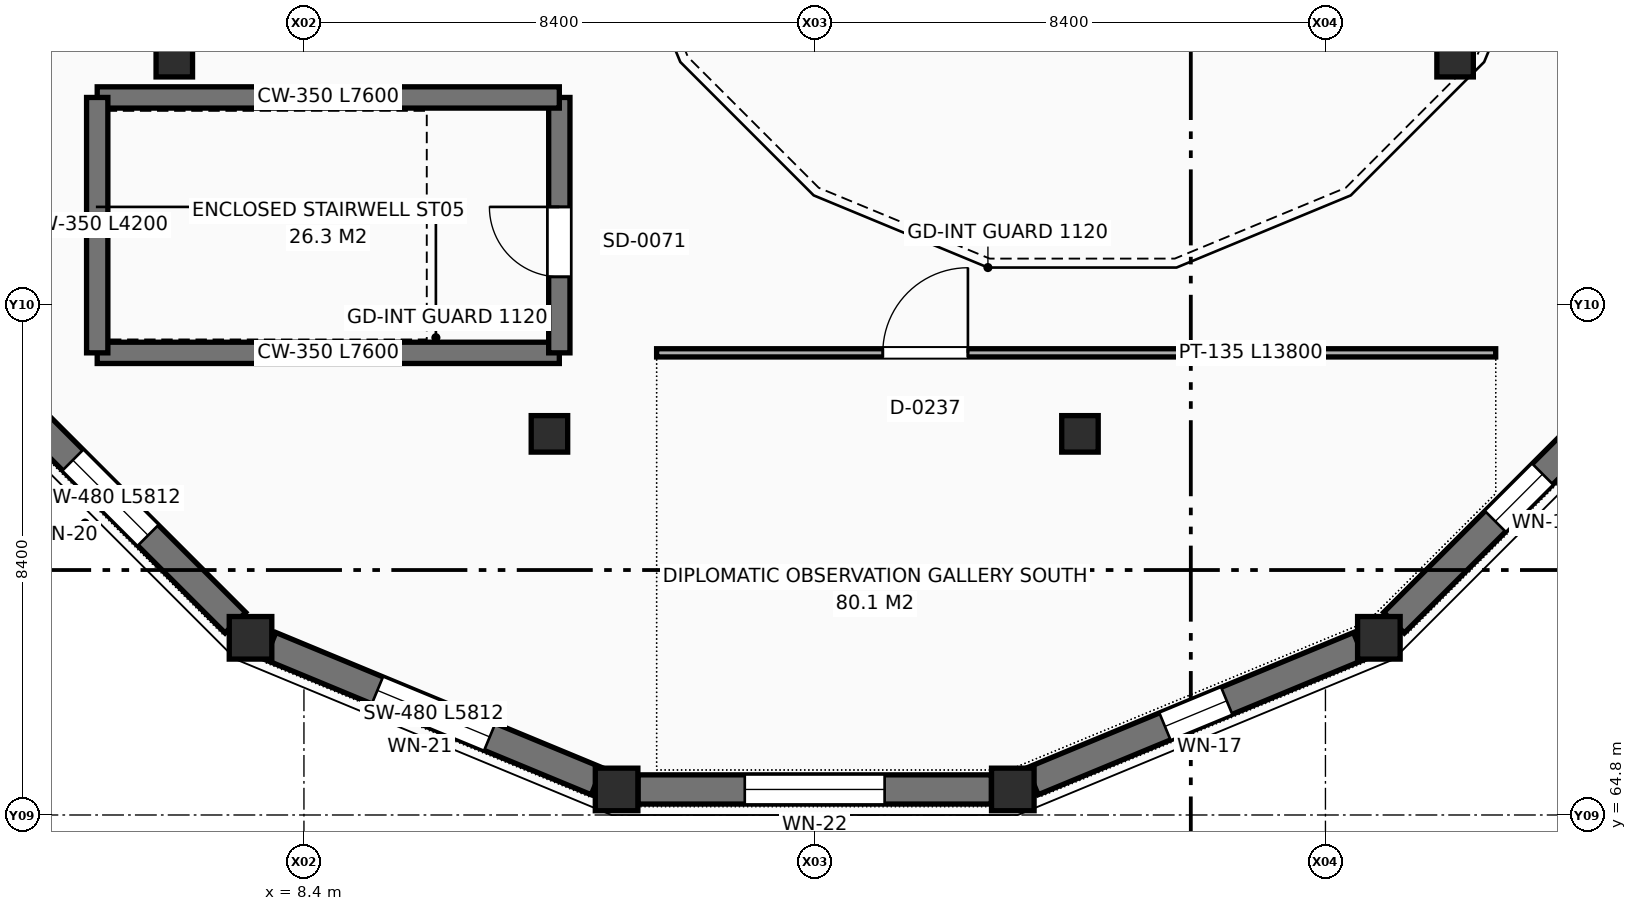
"""IFC4 building model, lengths in metres.
Left out: names, types, materials, properties, quantities, classifications, styles, units other than length and angle.
Written with IfcOpenShell. Run it as: python <this file> out.ifc"""

import sys

from ifc_helpers import new_model, si_unit, direction, frame, frame_2d, origin, origin_2d, place, context, subcontext, project, spatial, rectangle, circle, extrude, element, fill, save


model = new_model("IFC4")
c1 = context("Model", 3, precision=1e-05, world=origin(), true_north=direction((0.0, 1.0)))
c2 = subcontext(c1, "Body", "Model", "MODEL_VIEW")
j1 = project(units=[si_unit("LENGTHUNIT", "METRE"), si_unit("PLANEANGLEUNIT", "RADIAN")], contexts=[c1])
p1 = place(None, origin())
s1 = spatial("IfcSite", under=j1, at=p1, CompositionType="ELEMENT")
p2 = place(p1, origin())
s2 = spatial("IfcBuilding", under=s1, at=p2, CompositionType="ELEMENT")
p3 = place(p2, frame((0.0, 0.0, 13.8)))
s3 = spatial("IfcBuildingStorey", under=s2, at=p3, CompositionType="ELEMENT", Elevation=13.8)
for number, where, z_axis, x_axis in (
    (1, (7.521, 67.714, 0.0), (0.0, 0.0, 1.0), (1.0, 0.0, 0.0)),
    (2, (13.542, 65.22, 0.0), (0.0, 0.0, 1.0), (1.0, 0.0, 0.0)),
    (3, (20.058, 65.22, 0.0), (0.0, 0.0, 1.0), (1.0, 0.0, 0.0)),
    (4, (26.079, 67.714, 0.0), (0.0, 0.0, 1.0), (1.0, 0.0, 0.0)),
):
    element("IfcColumn", number, at=place(p3, frame(where, z_axis=z_axis, x_axis=x_axis)), inside=s3, PredefinedType="COLUMN", context=c2, shape_type="SweptSolid", body=[
        extrude(circle(Radius=0.35, at=origin_2d()), origin(), (0.0, 0.0, 1.0), 4.2),
    ])
for number, where, z_axis, x_axis in (
    (5, (6.268, 77.237, 0.0), (0.0, 0.0, 1.0), (1.0, 0.0, 0.0)),
    (6, (12.438, 71.068, 0.0), (0.0, 0.0, 1.0), (1.0, 0.0, 0.0)),
    (7, (21.163, 71.068, 0.0), (0.0, 0.0, 1.0), (1.0, 0.0, 0.0)),
    (8, (27.332, 77.237, 0.0), (0.0, 0.0, 1.0), (1.0, 0.0, 0.0)),
):
    element("IfcColumn", number, at=place(p3, frame(where, z_axis=z_axis, x_axis=x_axis)), inside=s3, PredefinedType="COLUMN", context=c2, shape_type="SweptSolid", body=[
        extrude(circle(Radius=0.3, at=origin_2d()), origin(), (0.0, 0.0, 1.0), 4.2),
    ])
p4 = place(p3, frame((3.163, 72.073, 0.0), z_axis=(0.0, 0.0, 1.0), x_axis=(0.707127782591, -0.707085779159, 0.0)))
e9 = element("IfcWall", 9, at=p4, inside=s3, PredefinedType="SHEAR", context=c2, shape_type="SweptSolid", body=[
    extrude(rectangle(XDim=5.812, YDim=0.48, at=frame_2d((2.906, 0.0))), origin(), (0.0, 0.0, 1.0), 3.1),
])
p5 = place(p4, frame((2.031, 0.0, 0.9)))
e10 = element("IfcOpeningElement", 10, at=p5, cuts=e9, PredefinedType="OPENING", context=c2, shape_type="SweptSolid", body=[
    extrude(rectangle(XDim=1.75, YDim=1.8, at=frame_2d((0.875, 0.9))), frame((0.0, 0.25, 0.0), z_axis=(0.0, -1.0, 0.0), x_axis=(1.0, 0.0, 0.0)), (0.0, 0.0, 1.0), 0.5),
])
p6 = place(p3, frame((7.847, 67.579, 0.0), z_axis=(0.0, 0.0, 1.0), x_axis=(0.923873997664, -0.382696794395, 0.0)))
e11 = element("IfcWall", 11, at=p6, inside=s3, PredefinedType="SHEAR", context=c2, shape_type="SweptSolid", body=[
    extrude(rectangle(XDim=5.812, YDim=0.48, at=frame_2d((2.906, 0.0))), origin(), (0.0, 0.0, 1.0), 3.1),
])
p7 = place(p6, frame((1.906, 0.0, 0.9)))
e12 = element("IfcOpeningElement", 12, at=p7, cuts=e11, PredefinedType="OPENING", context=c2, shape_type="SweptSolid", body=[
    extrude(rectangle(XDim=2.0, YDim=1.8, at=frame_2d((1.0, 0.9))), frame((0.0, 0.25, 0.0), z_axis=(0.0, -1.0, 0.0), x_axis=(1.0, 0.0, 0.0)), (0.0, 0.0, 1.0), 0.5),
])
p8 = place(p3, frame((13.894, 65.22, 0.0), z_axis=(0.0, 0.0, 1.0), x_axis=(1.0, 0.0, 0.0)))
e13 = element("IfcWall", 13, at=p8, inside=s3, PredefinedType="SHEAR", context=c2, shape_type="SweptSolid", body=[
    extrude(rectangle(XDim=5.812, YDim=0.48, at=frame_2d((2.906, 0.0))), origin(), (0.0, 0.0, 1.0), 3.1),
])
p9 = place(p8, frame((1.756, 0.0, 0.9)))
e14 = element("IfcOpeningElement", 14, at=p9, cuts=e13, PredefinedType="OPENING", context=c2, shape_type="SweptSolid", body=[
    extrude(rectangle(XDim=2.3, YDim=1.8, at=frame_2d((1.15, 0.9))), frame((0.0, 0.25, 0.0), z_axis=(0.0, -1.0, 0.0), x_axis=(1.0, 0.0, 0.0)), (0.0, 0.0, 1.0), 0.5),
])
p10 = place(p3, frame((20.383, 65.355, 0.0), z_axis=(0.0, 0.0, 1.0), x_axis=(0.923880149052, 0.3826819439, 0.0)))
e15 = element("IfcWall", 15, at=p10, inside=s3, PredefinedType="SHEAR", context=c2, shape_type="SweptSolid", body=[
    extrude(rectangle(XDim=5.812, YDim=0.48, at=frame_2d((2.906, 0.0))), origin(), (0.0, 0.0, 1.0), 3.1),
])
p11 = place(p10, frame((2.356, 0.0, 0.9)))
e16 = element("IfcOpeningElement", 16, at=p11, cuts=e15, PredefinedType="OPENING", context=c2, shape_type="SweptSolid", body=[
    extrude(rectangle(XDim=1.1, YDim=1.8, at=frame_2d((0.55, 0.9))), frame((0.0, 0.25, 0.0), z_axis=(0.0, -1.0, 0.0), x_axis=(1.0, 0.0, 0.0)), (0.0, 0.0, 1.0), 0.5),
])
p12 = place(p3, frame((26.327, 67.963, 0.0), z_axis=(0.0, 0.0, 1.0), x_axis=(0.707127782591, 0.707085779159, 0.0)))
e17 = element("IfcWall", 17, at=p12, inside=s3, PredefinedType="SHEAR", context=c2, shape_type="SweptSolid", body=[
    extrude(rectangle(XDim=5.812, YDim=0.48, at=frame_2d((2.906, 0.0))), origin(), (0.0, 0.0, 1.0), 3.1),
])
p13 = place(p12, frame((2.356, 0.0, 0.9)))
e18 = element("IfcOpeningElement", 18, at=p13, cuts=e17, PredefinedType="OPENING", context=c2, shape_type="SweptSolid", body=[
    extrude(rectangle(XDim=1.1, YDim=1.8, at=frame_2d((0.55, 0.9))), frame((0.0, 0.25, 0.0), z_axis=(0.0, -1.0, 0.0), x_axis=(1.0, 0.0, 0.0)), (0.0, 0.0, 1.0), 0.5),
])
p14 = place(p3, frame((5.0, 72.4, 0.0), z_axis=(0.0, 0.0, 1.0), x_axis=(1.0, 0.0, 0.0)))
e19 = element("IfcWall", 19, at=p14, inside=s3, PredefinedType="SHEAR", context=c2, shape_type="SweptSolid", body=[
    extrude(rectangle(XDim=7.6, YDim=0.35, at=frame_2d((3.8, 0.0))), origin(), (0.0, 0.0, 1.0), 3.92),
])
p15 = place(p3, frame((12.6, 72.4, 0.0), z_axis=(0.0, 0.0, 1.0), x_axis=(0.0, 1.0, 0.0)))
e20 = element("IfcWall", 20, at=p15, inside=s3, PredefinedType="SHEAR", context=c2, shape_type="SweptSolid", body=[
    extrude(rectangle(XDim=4.2, YDim=0.35, at=frame_2d((2.1, 0.0))), origin(), (0.0, 0.0, 1.0), 3.92),
])
p16 = place(p15, frame((1.25, 0.0, 0.0)))
e21 = element("IfcOpeningElement", 21, at=p16, cuts=e20, PredefinedType="OPENING", context=c2, shape_type="SweptSolid", body=[
    extrude(rectangle(XDim=1.15, YDim=2.2, at=frame_2d((0.575, 1.1))), frame((0.0, 0.185, 0.0), z_axis=(0.0, -1.0, 0.0), x_axis=(1.0, 0.0, 0.0)), (0.0, 0.0, 1.0), 0.37),
])
p17 = place(p3, frame((12.6, 76.6, 0.0), z_axis=(0.0, 0.0, 1.0), x_axis=(-1.0, 0.0, 0.0)))
e22 = element("IfcWall", 22, at=p17, inside=s3, PredefinedType="SHEAR", context=c2, shape_type="SweptSolid", body=[
    extrude(rectangle(XDim=7.6, YDim=0.35, at=frame_2d((3.8, 0.0))), origin(), (0.0, 0.0, 1.0), 3.92),
])
p18 = place(p3, frame((5.0, 76.6, 0.0), z_axis=(0.0, 0.0, 1.0), x_axis=(0.0, -1.0, 0.0)))
e23 = element("IfcWall", 23, at=p18, inside=s3, PredefinedType="SHEAR", context=c2, shape_type="SweptSolid", body=[
    extrude(rectangle(XDim=4.2, YDim=0.35, at=frame_2d((2.1, 0.0))), origin(), (0.0, 0.0, 1.0), 3.92),
])
p19 = place(p3, frame((14.2, 72.4, 0.0), z_axis=(0.0, 0.0, 1.0), x_axis=(1.0, 0.0, 0.0)))
e24 = element("IfcWall", 24, at=p19, inside=s3, PredefinedType="PARTITIONING", context=c2, shape_type="SweptSolid", body=[
    extrude(rectangle(XDim=13.8, YDim=0.135, at=frame_2d((6.9, 0.0))), origin(), (0.0, 0.0, 1.0), 3.86),
])
p20 = place(p19, frame((3.72, 0.0, 0.0)))
e25 = element("IfcOpeningElement", 25, at=p20, cuts=e24, PredefinedType="OPENING", context=c2, shape_type="SweptSolid", body=[
    extrude(rectangle(XDim=1.4, YDim=2.25, at=frame_2d((0.7, 1.125))), frame((0.0, 0.077, 0.0), z_axis=(0.0, -1.0, 0.0), x_axis=(1.0, 0.0, 0.0)), (0.0, 0.0, 1.0), 0.155),
])
p21 = place(p5, origin())
e26 = element("IfcWindow", 26, at=p21, inside=s3, PartitioningType="SINGLE_PANEL", PredefinedType="WINDOW", context=c2, shape_type="SweptSolid", body=[
    extrude(rectangle(XDim=1.75, YDim=1.8, at=frame_2d((0.875, 0.9))), frame((0.0, 0.03, 0.0), z_axis=(0.0, -1.0, 0.0), x_axis=(1.0, 0.0, 0.0)), (0.0, 0.0, 1.0), 0.06),
])
fill(e10, e26)
p22 = place(p7, origin())
e27 = element("IfcWindow", 27, at=p22, inside=s3, PartitioningType="SINGLE_PANEL", PredefinedType="WINDOW", context=c2, shape_type="SweptSolid", body=[
    extrude(rectangle(XDim=2.0, YDim=1.8, at=frame_2d((1.0, 0.9))), frame((0.0, 0.03, 0.0), z_axis=(0.0, -1.0, 0.0), x_axis=(1.0, 0.0, 0.0)), (0.0, 0.0, 1.0), 0.06),
])
fill(e12, e27)
p23 = place(p9, origin())
e28 = element("IfcWindow", 28, at=p23, inside=s3, PartitioningType="SINGLE_PANEL", PredefinedType="WINDOW", context=c2, shape_type="SweptSolid", body=[
    extrude(rectangle(XDim=2.3, YDim=1.8, at=frame_2d((1.15, 0.9))), frame((0.0, 0.03, 0.0), z_axis=(0.0, -1.0, 0.0), x_axis=(1.0, 0.0, 0.0)), (0.0, 0.0, 1.0), 0.06),
])
fill(e14, e28)
p24 = place(p11, origin())
e29 = element("IfcWindow", 29, at=p24, inside=s3, PartitioningType="SINGLE_PANEL", PredefinedType="WINDOW", context=c2, shape_type="SweptSolid", body=[
    extrude(rectangle(XDim=1.1, YDim=1.8, at=frame_2d((0.55, 0.9))), frame((0.0, 0.03, 0.0), z_axis=(0.0, -1.0, 0.0), x_axis=(1.0, 0.0, 0.0)), (0.0, 0.0, 1.0), 0.06),
])
fill(e16, e29)
p25 = place(p13, origin())
e30 = element("IfcWindow", 30, at=p25, inside=s3, PartitioningType="SINGLE_PANEL", PredefinedType="WINDOW", context=c2, shape_type="SweptSolid", body=[
    extrude(rectangle(XDim=1.1, YDim=1.8, at=frame_2d((0.55, 0.9))), frame((0.0, 0.03, 0.0), z_axis=(0.0, -1.0, 0.0), x_axis=(1.0, 0.0, 0.0)), (0.0, 0.0, 1.0), 0.06),
])
fill(e18, e30)
p26 = place(p16, origin())
e31 = element("IfcDoor", 31, at=p26, inside=s3, OperationType="SINGLE_SWING_RIGHT", PredefinedType="DOOR", context=c2, shape_type="SweptSolid", body=[
    extrude(rectangle(XDim=1.15, YDim=2.2, at=frame_2d((0.575, 1.1))), frame((0.0, 0.025, 0.0), z_axis=(0.0, -1.0, 0.0), x_axis=(1.0, 0.0, 0.0)), (0.0, 0.0, 1.0), 0.05),
])
fill(e21, e31)
p27 = place(p20, origin())
e32 = element("IfcDoor", 32, at=p27, inside=s3, OperationType="SINGLE_SWING_RIGHT", PredefinedType="DOOR", context=c2, shape_type="SweptSolid", body=[
    extrude(rectangle(XDim=1.4, YDim=2.25, at=frame_2d((0.7, 1.125))), frame((0.0, 0.025, 0.0), z_axis=(0.0, -1.0, 0.0), x_axis=(1.0, 0.0, 0.0)), (0.0, 0.0, 1.0), 0.05),
])
fill(e25, e32)
save(model, sys.argv[1])
